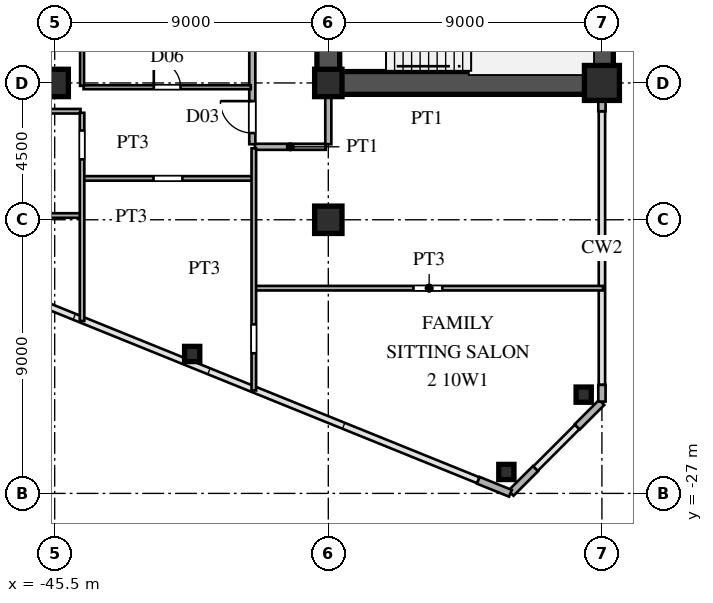
"""IFC4 building model, lengths in metres.
Left out: names, types, materials, properties, quantities, classifications, styles, units other than length and angle.
Written with IfcOpenShell. Run it as: python <this file> out.ifc"""

import sys

from ifc_helpers import new_model, si_unit, direction, frame, frame_2d, origin, origin_2d, place, context, subcontext, project, spatial, rectangle, hollow_rectangle, i_section, extrude, source, transform, mapped, element, fill, save


model = new_model("IFC4")
c1 = context("Model", 3, precision=1e-05, world=origin(), true_north=direction((0.0, 1.0)))
c2 = subcontext(c1, "Body", "Model", "MODEL_VIEW")
j1 = project(units=[si_unit("LENGTHUNIT", "METRE"), si_unit("PLANEANGLEUNIT", "RADIAN")], contexts=[c1])
p1 = place(None, origin())
s1 = spatial("IfcSite", under=j1, at=p1, CompositionType="ELEMENT")
p2 = place(p1, origin())
s2 = spatial("IfcBuilding", under=s1, at=p2, CompositionType="ELEMENT")
p3 = place(p2, frame((0.0, 0.0, 40.5)))
s3 = spatial("IfcBuildingStorey", under=s2, at=p3, CompositionType="ELEMENT", Elevation=40.5)
m1 = source(origin(), c2, "Body", "SweptSolid", [
    extrude(hollow_rectangle(XDim=1.15, YDim=1.15, WallThickness=0.048, at=origin_2d()), origin(), (0.0, 0.0, 1.0), 3.6),
])
p4 = place(p3, frame((-27.5, -13.5, 0.0), z_axis=(0.0, 0.0, 1.0), x_axis=(1.0, 0.0, 0.0)))
e1 = element("IfcColumn", 1, at=p4, inside=s3, PredefinedType="COLUMN", context=c2, shape_type="MappedRepresentation", body=[
    mapped(m1, transform((0.0, 0.0, 0.0), scale=1.0)),
])
m2 = source(origin(), c2, "Body", "SweptSolid", [
    extrude(i_section(OverallWidth=0.9, OverallDepth=0.9, WebThickness=0.036, FlangeThickness=0.055, at=origin_2d()), origin(), (0.0, 0.0, 1.0), 3.6),
])
for number, where, z_axis, x_axis in (
    (2, (-36.5, -18.0, 0.0), (0.0, 0.0, 1.0), (1.0, 0.0, 0.0)),
    (3, (-36.5, -13.5, 0.0), (0.0, 0.0, 1.0), (1.0, 0.0, 0.0)),
    (4, (-45.5, -13.5, 0.0), (0.0, 0.0, 1.0), (1.0, 0.0, 0.0)),
):
    element("IfcColumn", number, at=place(p3, frame(where, z_axis=z_axis, x_axis=x_axis)), inside=s3, PredefinedType="COLUMN", context=c2, shape_type="MappedRepresentation", body=[
        mapped(m2, transform((0.0, 0.0, 0.0), scale=1.0)),
    ])
m3 = source(origin(), c2, "Body", "SweptSolid", [
    extrude(hollow_rectangle(XDim=0.5, YDim=0.5, WallThickness=0.02, at=origin_2d()), origin(), (0.0, 0.0, 1.0), 3.6),
])
for number, where, z_axis, x_axis in (
    (5, (-28.1, -23.751, 0.0), (0.0, 0.0, 1.0), (1.0, 0.0, 0.0)),
    (6, (-30.643, -26.295, 0.0), (0.0, 0.0, 1.0), (1.0, 0.0, 0.0)),
    (7, (-40.977, -22.414, 0.0), (0.0, 0.0, 1.0), (1.0, 0.0, 0.0)),
):
    element("IfcColumn", number, at=place(p3, frame(where, z_axis=z_axis, x_axis=x_axis)), inside=s3, PredefinedType="COLUMN", context=c2, shape_type="MappedRepresentation", body=[
        mapped(m3, transform((0.0, 0.0, 0.0), scale=1.0)),
    ])
p5 = place(p3, frame((-27.5, -23.98, 0.0), z_axis=(0.0, 0.0, 1.0), x_axis=(0.0, 1.0, 0.0)))
e8 = element("IfcWall", 8, at=p5, inside=s3, PredefinedType="SOLIDWALL", context=c2, shape_type="SweptSolid", body=[
    extrude(rectangle(XDim=0.55, YDim=0.24, at=frame_2d((0.275, 0.0))), origin(), (0.0, 0.0, 1.0), 3.38),
])
p6 = place(p3, frame((-27.5, -14.43, 0.0), z_axis=(0.0, 0.0, 1.0), x_axis=(0.0, 1.0, 0.0)))
e9 = element("IfcWall", 9, at=p6, inside=s3, PredefinedType="SOLIDWALL", context=c2, shape_type="SweptSolid", body=[
    extrude(rectangle(XDim=0.55, YDim=0.24, at=frame_2d((0.275, 0.0))), origin(), (0.0, 0.0, 1.0), 2.88),
])
p7 = place(p3, frame((-31.566, -26.569, 0.0), z_axis=(0.0, 0.0, 1.0), x_axis=(0.927007103665, -0.375043770452, 0.0)))
e10 = element("IfcWall", 10, at=p7, inside=s3, PredefinedType="SOLIDWALL", context=c2, shape_type="SweptSolid", body=[
    extrude(rectangle(XDim=1.14, YDim=0.24, at=frame_2d((0.57, 0.0))), origin(), (0.0, 0.0, 1.0), 3.38),
])
for number, where, z_axis, x_axis in (
    (11, (-30.493, -26.993, 0.0), (0.0, 0.0, 1.0), (0.707, 0.707, 0.0)),
    (12, (-28.313, -24.813, 0.0), (0.0, 0.0, 1.0), (0.707, 0.707, 0.0)),
):
    element("IfcWall", number, at=place(p3, frame(where, z_axis=z_axis, x_axis=x_axis)), inside=s3, PredefinedType="SOLIDWALL", context=c2, shape_type="SweptSolid", body=[
        extrude(rectangle(XDim=1.14, YDim=0.24, at=frame_2d((0.57, 0.0))), origin(), (0.0, 0.0, 1.0), 3.38),
    ])
p8 = place(p3, frame((-27.5, -13.5, 0.0), z_axis=(0.0, 0.0, 1.0), x_axis=(0.0, 1.0, 0.0)))
e13 = element("IfcWall", 13, at=p8, inside=s3, PredefinedType="SHEAR", context=c2, shape_type="SweptSolid", body=[
    extrude(rectangle(XDim=12.2, YDim=0.75, at=frame_2d((6.1, 0.0))), origin(), (0.0, 0.0, 1.0), 3.38),
])
p9 = place(p3, frame((-36.5, -13.5, 0.0), z_axis=(0.0, 0.0, 1.0), x_axis=(1.0, 0.0, 0.0)))
e14 = element("IfcWall", 14, at=p9, inside=s3, PredefinedType="SHEAR", context=c2, shape_type="SweptSolid", body=[
    extrude(rectangle(XDim=9.0, YDim=0.75, at=frame_2d((4.5, 0.0))), origin(), (0.0, 0.0, 1.0), 3.38),
])
p10 = place(p3, frame((-36.5, -13.65, 0.0), z_axis=(0.0, 0.0, 1.0), x_axis=(0.0, 1.0, 0.0)))
e15 = element("IfcWall", 15, at=p10, inside=s3, PredefinedType="SHEAR", context=c2, shape_type="SweptSolid", body=[
    extrude(rectangle(XDim=7.15, YDim=0.75, at=frame_2d((3.575, 0.0))), origin(), (0.0, 0.0, 1.0), 3.38),
])
p11 = place(p10, frame((4.675, 0.0, 0.0)))
e16 = element("IfcOpeningElement", 16, at=p11, cuts=e15, PredefinedType="OPENING", context=c2, shape_type="SweptSolid", body=[
    extrude(rectangle(XDim=1.15, YDim=2.2, at=frame_2d((0.575, 1.1))), frame((0.0, 0.385, 0.0), z_axis=(0.0, -1.0, 0.0), x_axis=(1.0, 0.0, 0.0)), (0.0, 0.0, 1.0), 0.77),
])
p12 = place(p3, frame((-38.9, -20.25, 0.0), z_axis=(0.0, 0.0, 1.0), x_axis=(1.0, 0.0, 0.0)))
e17 = element("IfcWall", 17, at=p12, inside=s3, PredefinedType="PARTITIONING", context=c2, shape_type="SweptSolid", body=[
    extrude(rectangle(XDim=11.435, YDim=0.15, at=frame_2d((5.717, 0.0))), origin(), (0.0, 0.0, 1.0), 3.38),
])
p13 = place(p12, frame((5.2, 0.0, 0.0)))
e18 = element("IfcOpeningElement", 18, at=p13, cuts=e17, PredefinedType="OPENING", context=c2, shape_type="SweptSolid", body=[
    extrude(rectangle(XDim=0.95, YDim=2.15, at=frame_2d((0.475, 1.075))), frame((0.0, 0.085, 0.0), z_axis=(0.0, -1.0, 0.0), x_axis=(1.0, 0.0, 0.0)), (0.0, 0.0, 1.0), 0.17),
])
p14 = place(p3, frame((-53.111, -17.86, 0.0), z_axis=(0.0, 0.0, 1.0), x_axis=(1.0, 0.0, 0.0)))
e19 = element("IfcWall", 19, at=p14, inside=s3, PredefinedType="PARTITIONING", context=c2, shape_type="SweptSolid", body=[
    extrude(rectangle(XDim=8.461, YDim=0.15, at=frame_2d((4.23, 0.0))), origin(), (0.0, 0.0, 1.0), 3.38),
])
p15 = place(p14, frame((3.798, 0.0, 0.0)))
e20 = element("IfcOpeningElement", 20, at=p15, cuts=e19, PredefinedType="OPENING", context=c2, shape_type="SweptSolid", body=[
    extrude(rectangle(XDim=0.95, YDim=2.15, at=frame_2d((0.475, 1.075))), frame((0.0, 0.085, 0.0), z_axis=(0.0, -1.0, 0.0), x_axis=(1.0, 0.0, 0.0)), (0.0, 0.0, 1.0), 0.17),
])
p16 = place(p3, frame((-44.55, -16.64, 0.0), z_axis=(0.0, 0.0, 1.0), x_axis=(1.0, 0.0, 0.0)))
e21 = element("IfcWall", 21, at=p16, inside=s3, PredefinedType="PARTITIONING", context=c2, shape_type="SweptSolid", body=[
    extrude(rectangle(XDim=5.55, YDim=0.15, at=frame_2d((2.775, 0.0))), origin(), (0.0, 0.0, 1.0), 3.38),
])
p17 = place(p16, frame((2.3, 0.0, 0.0)))
e22 = element("IfcOpeningElement", 22, at=p17, cuts=e21, PredefinedType="OPENING", context=c2, shape_type="SweptSolid", body=[
    extrude(rectangle(XDim=0.95, YDim=2.15, at=frame_2d((0.475, 1.075))), frame((0.0, 0.085, 0.0), z_axis=(0.0, -1.0, 0.0), x_axis=(1.0, 0.0, 0.0)), (0.0, 0.0, 1.0), 0.17),
])
p18 = place(p3, frame((-38.915, -15.6, 0.0), z_axis=(0.0, 0.0, 1.0), x_axis=(1.0, 0.0, 0.0)))
e23 = element("IfcWall", 23, at=p18, inside=s3, PredefinedType="PARTITIONING", context=c2, shape_type="SweptSolid", body=[
    extrude(rectangle(XDim=2.33, YDim=0.2, at=frame_2d((1.165, 0.0))), origin(), (0.0, 0.0, 1.0), 3.38),
])
p19 = place(p3, frame((-61.588, -14.43, 0.0), z_axis=(0.0, 0.0, 1.0), x_axis=(1.0, 0.0, 0.0)))
e24 = element("IfcWall", 24, at=p19, inside=s3, PredefinedType="PARTITIONING", context=c2, shape_type="SweptSolid", body=[
    extrude(rectangle(XDim=16.938, YDim=0.15, at=frame_2d((8.469, 0.0))), origin(), (0.0, 0.0, 1.0), 3.38),
])
p20 = place(p19, frame((11.563, 0.0, 0.0)))
e25 = element("IfcOpeningElement", 25, at=p20, cuts=e24, PredefinedType="OPENING", context=c2, shape_type="SweptSolid", body=[
    extrude(rectangle(XDim=0.95, YDim=2.15, at=frame_2d((0.475, 1.075))), frame((0.0, 0.085, 0.0), z_axis=(0.0, -1.0, 0.0), x_axis=(1.0, 0.0, 0.0)), (0.0, 0.0, 1.0), 0.17),
])
p21 = place(p3, frame((-44.55, -13.64, 0.0), z_axis=(0.0, 0.0, 1.0), x_axis=(1.0, 0.0, 0.0)))
e26 = element("IfcWall", 26, at=p21, inside=s3, PredefinedType="PARTITIONING", context=c2, shape_type="SweptSolid", body=[
    extrude(rectangle(XDim=5.5, YDim=0.13, at=frame_2d((2.75, 0.0))), origin(), (0.0, 0.0, 1.0), 2.68),
])
p22 = place(p21, frame((2.31, 0.0, 0.0)))
e27 = element("IfcOpeningElement", 27, at=p22, cuts=e26, PredefinedType="OPENING", context=c2, shape_type="SweptSolid", body=[
    extrude(rectangle(XDim=0.88, YDim=2.1, at=frame_2d((0.44, 1.05))), frame((0.0, 0.075, 0.0), z_axis=(0.0, -1.0, 0.0), x_axis=(1.0, 0.0, 0.0)), (0.0, 0.0, 1.0), 0.15),
])
p23 = place(p3, frame((-44.6, -21.328, 0.0), z_axis=(0.0, 0.0, 1.0), x_axis=(0.0, 1.0, 0.0)))
e28 = element("IfcWall", 28, at=p23, inside=s3, PredefinedType="PARTITIONING", context=c2, shape_type="SweptSolid", body=[
    extrude(rectangle(XDim=6.847, YDim=0.15, at=frame_2d((3.423, 0.0))), origin(), (0.0, 0.0, 1.0), 3.38),
])
p24 = place(p23, frame((5.315, 0.0, 0.0)))
e29 = element("IfcOpeningElement", 29, at=p24, cuts=e28, PredefinedType="OPENING", context=c2, shape_type="SweptSolid", body=[
    extrude(rectangle(XDim=0.95, YDim=2.15, at=frame_2d((0.475, 1.075))), frame((0.0, 0.085, 0.0), z_axis=(0.0, -1.0, 0.0), x_axis=(1.0, 0.0, 0.0)), (0.0, 0.0, 1.0), 0.17),
])
p25 = place(p3, frame((-44.6, -13.595, 0.0), z_axis=(0.0, 0.0, 1.0), x_axis=(0.0, 1.0, 0.0)))
e30 = element("IfcWall", 30, at=p25, inside=s3, PredefinedType="PARTITIONING", context=c2, shape_type="SweptSolid", body=[
    extrude(rectangle(XDim=15.553, YDim=0.13, at=frame_2d((7.776, 0.0))), origin(), (0.0, 0.0, 1.0), 3.38),
])
p26 = place(p25, frame((5.817, 0.0, 0.0)))
e31 = element("IfcOpeningElement", 31, at=p26, cuts=e30, PredefinedType="OPENING", context=c2, shape_type="SweptSolid", body=[
    extrude(rectangle(XDim=0.95, YDim=2.15, at=frame_2d((0.475, 1.075))), frame((0.0, 0.075, 0.0), z_axis=(0.0, -1.0, 0.0), x_axis=(1.0, 0.0, 0.0)), (0.0, 0.0, 1.0), 0.15),
])
p27 = place(p25, frame((7.602, 0.0, 0.0)))
e32 = element("IfcOpeningElement", 32, at=p27, cuts=e30, PredefinedType="OPENING", context=c2, shape_type="SweptSolid", body=[
    extrude(rectangle(XDim=0.95, YDim=2.15, at=frame_2d((0.475, 1.075))), frame((0.0, 0.075, 0.0), z_axis=(0.0, -1.0, 0.0), x_axis=(1.0, 0.0, 0.0)), (0.0, 0.0, 1.0), 0.15),
])
p28 = place(p3, frame((-39.0, -15.515, 0.0), z_axis=(0.0, 0.0, 1.0), x_axis=(0.0, 1.0, 0.0)))
e33 = element("IfcWall", 33, at=p28, inside=s3, PredefinedType="PARTITIONING", context=c2, shape_type="SweptSolid", body=[
    extrude(rectangle(XDim=31.03, YDim=0.2, at=frame_2d((15.515, 0.0))), origin(), (0.0, 0.0, 1.0), 3.38),
])
p29 = place(p28, frame((0.367, 0.0, 0.0)))
e34 = element("IfcOpeningElement", 34, at=p29, cuts=e33, PredefinedType="OPENING", context=c2, shape_type="SweptSolid", body=[
    extrude(rectangle(XDim=1.05, YDim=2.25, at=frame_2d((0.525, 1.125))), frame((0.0, 0.11, 0.0), z_axis=(0.0, -1.0, 0.0), x_axis=(1.0, 0.0, 0.0)), (0.0, 0.0, 1.0), 0.22),
])
p30 = place(p28, frame((8.638, 0.0, 0.0)))
e35 = element("IfcOpeningElement", 35, at=p30, cuts=e33, PredefinedType="OPENING", context=c2, shape_type="SweptSolid", body=[
    extrude(rectangle(XDim=1.05, YDim=2.25, at=frame_2d((0.525, 1.125))), frame((0.0, 0.11, 0.0), z_axis=(0.0, -1.0, 0.0), x_axis=(1.0, 0.0, 0.0)), (0.0, 0.0, 1.0), 0.22),
])
p31 = place(p28, frame((19.795, 0.0, 0.0)))
e36 = element("IfcOpeningElement", 36, at=p31, cuts=e33, PredefinedType="OPENING", context=c2, shape_type="SweptSolid", body=[
    extrude(rectangle(XDim=1.05, YDim=2.25, at=frame_2d((0.525, 1.125))), frame((0.0, 0.11, 0.0), z_axis=(0.0, -1.0, 0.0), x_axis=(1.0, 0.0, 0.0)), (0.0, 0.0, 1.0), 0.22),
])
p32 = place(p28, frame((29.82, 0.0, 0.0)))
e37 = element("IfcOpeningElement", 37, at=p32, cuts=e33, PredefinedType="OPENING", context=c2, shape_type="SweptSolid", body=[
    extrude(rectangle(XDim=1.05, YDim=2.25, at=frame_2d((0.525, 1.125))), frame((0.0, 0.11, 0.0), z_axis=(0.0, -1.0, 0.0), x_axis=(1.0, 0.0, 0.0)), (0.0, 0.0, 1.0), 0.22),
])
p33 = place(p3, frame((-38.95, -23.615, 0.0), z_axis=(0.0, 0.0, 1.0), x_axis=(0.0, 1.0, 0.0)))
e38 = element("IfcWall", 38, at=p33, inside=s3, PredefinedType="PARTITIONING", context=c2, shape_type="SweptSolid", body=[
    extrude(rectangle(XDim=7.965, YDim=0.15, at=frame_2d((3.982, 0.0))), origin(), (0.0, 0.0, 1.0), 3.38),
])
p34 = place(p33, frame((1.225, 0.0, 0.0)))
e39 = element("IfcOpeningElement", 39, at=p34, cuts=e38, PredefinedType="OPENING", context=c2, shape_type="SweptSolid", body=[
    extrude(rectangle(XDim=0.95, YDim=2.15, at=frame_2d((0.475, 1.075))), frame((0.0, 0.085, 0.0), z_axis=(0.0, -1.0, 0.0), x_axis=(1.0, 0.0, 0.0)), (0.0, 0.0, 1.0), 0.17),
])
p35 = place(p3, frame((-36.5, -15.515, 0.0), z_axis=(0.0, 0.0, 1.0), x_axis=(0.0, 1.0, 0.0)))
e40 = element("IfcWall", 40, at=p35, inside=s3, PredefinedType="PARTITIONING", context=c2, shape_type="SweptSolid", body=[
    extrude(rectangle(XDim=1.635, YDim=0.2, at=frame_2d((0.817, 0.0))), origin(), (0.0, 0.0, 1.0), 2.68),
])
m4 = source(origin(), c2, "Body", "SweptSolid", [
    extrude(rectangle(XDim=0.88, YDim=2.1, at=frame_2d((0.44, 1.05))), frame((0.0, 0.025, 0.0), z_axis=(0.0, -1.0, 0.0), x_axis=(1.0, 0.0, 0.0)), (0.0, 0.0, 1.0), 0.05),
])
p36 = place(p22, origin())
e41 = element("IfcDoor", 41, at=p36, inside=s3, OperationType="SINGLE_SWING_LEFT", PredefinedType="DOOR", context=c2, shape_type="MappedRepresentation", body=[
    mapped(m4, transform((0.0, 0.0, 0.0), scale=1.0)),
])
fill(e27, e41)
m5 = source(origin(), c2, "Body", "SweptSolid", [
    extrude(rectangle(XDim=1.05, YDim=2.25, at=frame_2d((0.525, 1.125))), frame((0.0, 0.025, 0.0), z_axis=(0.0, -1.0, 0.0), x_axis=(1.0, 0.0, 0.0)), (0.0, 0.0, 1.0), 0.05),
])
p37 = place(p29, origin())
e42 = element("IfcDoor", 42, at=p37, inside=s3, OperationType="SINGLE_SWING_RIGHT", PredefinedType="DOOR", context=c2, shape_type="MappedRepresentation", body=[
    mapped(m5, transform((0.0, 0.0, 0.0), scale=1.0)),
])
fill(e34, e42)
save(model, sys.argv[1])
